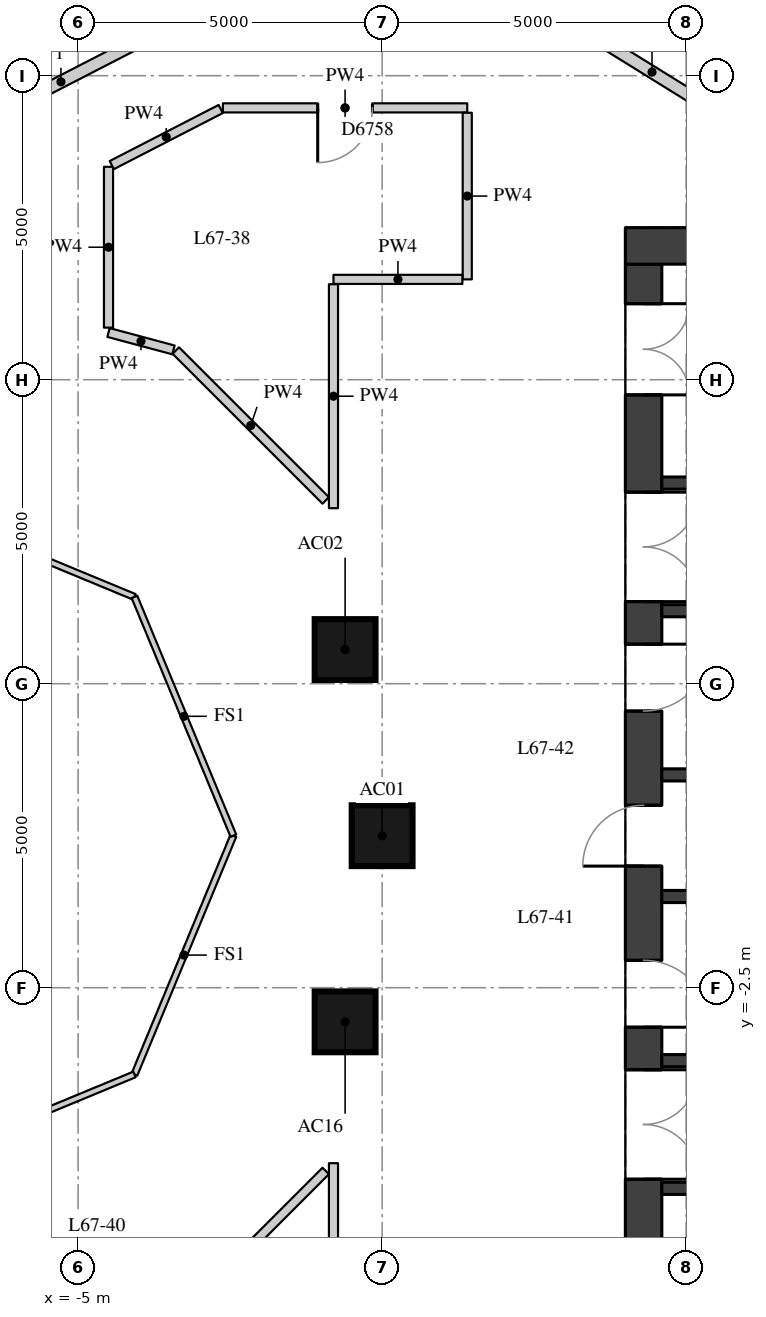
"""IFC4 building model, lengths in metres.
Left out: names, types, materials, properties, quantities, classifications, styles, units other than length and angle.
Written with IfcOpenShell. Run it as: python <this file> out.ifc"""

import sys

from ifc_helpers import new_model, si_unit, direction, frame, frame_2d, origin, origin_2d, place, context, subcontext, project, spatial, rectangle, extrude, element, fill, save


model = new_model("IFC4")
c1 = context("Model", 3, precision=1e-05, world=origin(), true_north=direction((0.0, 1.0)))
c2 = subcontext(c1, "Body", "Model", "MODEL_VIEW")
j1 = project(units=[si_unit("LENGTHUNIT", "METRE"), si_unit("PLANEANGLEUNIT", "RADIAN")], contexts=[c1])
p1 = place(None, origin())
s1 = spatial("IfcSite", under=j1, at=p1, CompositionType="ELEMENT")
p2 = place(p1, origin())
s2 = spatial("IfcBuilding", under=s1, at=p2, CompositionType="ELEMENT")
p3 = place(p2, frame((0.0, 0.0, 236.6)))
s3 = spatial("IfcBuildingStorey", under=s2, at=p3, CompositionType="ELEMENT", Elevation=236.6)
for number, where, z_axis, x_axis in (
    (1, (0.0, 0.0, 0.0), (0.0, 0.0, 1.0), (1.0, 0.0, 0.0)),
    (2, (-0.609, 3.062, 0.0), (0.0, 0.0, 1.0), (1.0, 0.0, 0.0)),
    (3, (-0.609, -3.062, 0.0), (0.0, 0.0, 1.0), (1.0, 0.0, 0.0)),
):
    element("IfcColumn", number, at=place(p3, frame(where, z_axis=z_axis, x_axis=x_axis)), inside=s3, PredefinedType="COLUMN", context=c2, shape_type="SweptSolid", body=[
        extrude(rectangle(XDim=1.0, YDim=1.0, at=origin_2d()), origin(), (0.0, 0.0, 1.0), 3.3),
    ])
p4 = place(p3, frame((4.3, -9.4, 0.0), z_axis=(0.0, 0.0, 1.0), x_axis=(0.0, 1.0, 0.0)))
e4 = element("IfcWall", 4, at=p4, inside=s3, PredefinedType="SHEAR", context=c2, shape_type="SweptSolid", body=[
    extrude(rectangle(XDim=18.8, YDim=0.6, at=frame_2d((9.4, 0.0))), origin(), (0.0, 0.0, 1.0), 3.02),
])
p5 = place(p4, frame((0.65, 0.0, 0.0)))
e5 = element("IfcOpeningElement", 5, at=p5, cuts=e4, PredefinedType="OPENING", context=c2, shape_type="SweptSolid", body=[
    extrude(rectangle(XDim=1.5, YDim=2.1, at=frame_2d((0.75, 1.05))), frame((0.0, 0.31, 0.0), z_axis=(0.0, -1.0, 0.0), x_axis=(1.0, 0.0, 0.0)), (0.0, 0.0, 1.0), 0.62),
])
p6 = place(p4, frame((3.75, 0.0, 0.0)))
e6 = element("IfcOpeningElement", 6, at=p6, cuts=e4, PredefinedType="OPENING", context=c2, shape_type="SweptSolid", body=[
    extrude(rectangle(XDim=1.8, YDim=2.1, at=frame_2d((0.9, 1.05))), frame((0.0, 0.31, 0.0), z_axis=(0.0, -1.0, 0.0), x_axis=(1.0, 0.0, 0.0)), (0.0, 0.0, 1.0), 0.62),
])
p7 = place(p4, frame((6.25, 0.0, 0.0)))
e7 = element("IfcOpeningElement", 7, at=p7, cuts=e4, PredefinedType="OPENING", context=c2, shape_type="SweptSolid", body=[
    extrude(rectangle(XDim=1.1, YDim=2.1, at=frame_2d((0.55, 1.05))), frame((0.0, 0.31, 0.0), z_axis=(0.0, -1.0, 0.0), x_axis=(1.0, 0.0, 0.0)), (0.0, 0.0, 1.0), 0.62),
])
p8 = place(p4, frame((8.9, 0.0, 0.0)))
e8 = element("IfcOpeningElement", 8, at=p8, cuts=e4, PredefinedType="OPENING", context=c2, shape_type="SweptSolid", body=[
    extrude(rectangle(XDim=1.0, YDim=2.1, at=frame_2d((0.5, 1.05))), frame((0.0, 0.31, 0.0), z_axis=(0.0, -1.0, 0.0), x_axis=(1.0, 0.0, 0.0)), (0.0, 0.0, 1.0), 0.62),
])
p9 = place(p4, frame((11.45, 0.0, 0.0)))
e9 = element("IfcOpeningElement", 9, at=p9, cuts=e4, PredefinedType="OPENING", context=c2, shape_type="SweptSolid", body=[
    extrude(rectangle(XDim=1.1, YDim=2.1, at=frame_2d((0.55, 1.05))), frame((0.0, 0.31, 0.0), z_axis=(0.0, -1.0, 0.0), x_axis=(1.0, 0.0, 0.0)), (0.0, 0.0, 1.0), 0.62),
])
p10 = place(p4, frame((13.25, 0.0, 0.0)))
e10 = element("IfcOpeningElement", 10, at=p10, cuts=e4, PredefinedType="OPENING", context=c2, shape_type="SweptSolid", body=[
    extrude(rectangle(XDim=1.8, YDim=2.1, at=frame_2d((0.9, 1.05))), frame((0.0, 0.31, 0.0), z_axis=(0.0, -1.0, 0.0), x_axis=(1.0, 0.0, 0.0)), (0.0, 0.0, 1.0), 0.62),
])
p11 = place(p4, frame((16.65, 0.0, 0.0)))
e11 = element("IfcOpeningElement", 11, at=p11, cuts=e4, PredefinedType="OPENING", context=c2, shape_type="SweptSolid", body=[
    extrude(rectangle(XDim=1.5, YDim=2.1, at=frame_2d((0.75, 1.05))), frame((0.0, 0.31, 0.0), z_axis=(0.0, -1.0, 0.0), x_axis=(1.0, 0.0, 0.0)), (0.0, 0.0, 1.0), 0.62),
])
p12 = place(p3, frame((4.0, 9.7, 0.0), z_axis=(0.0, 0.0, 1.0), x_axis=(1.0, 0.0, 0.0)))
e12 = element("IfcWall", 12, at=p12, inside=s3, PredefinedType="SHEAR", context=c2, shape_type="SweptSolid", body=[
    extrude(rectangle(XDim=12.0, YDim=0.6, at=frame_2d((6.0, 0.0))), origin(), (0.0, 0.0, 1.0), 3.02),
])
p13 = place(p3, frame((4.6, 5.8, 0.0), z_axis=(0.0, 0.0, 1.0), x_axis=(1.0, 0.0, 0.0)))
e13 = element("IfcWall", 13, at=p13, inside=s3, PredefinedType="SHEAR", context=c2, shape_type="SweptSolid", body=[
    extrude(rectangle(XDim=10.8, YDim=0.2, at=frame_2d((5.4, 0.0))), origin(), (0.0, 0.0, 1.0), 3.02),
])
p14 = place(p13, frame((7.05, 0.0, 0.0)))
e14 = element("IfcOpeningElement", 14, at=p14, cuts=e13, PredefinedType="OPENING", context=c2, shape_type="SweptSolid", body=[
    extrude(rectangle(XDim=1.1, YDim=2.1, at=frame_2d((0.55, 1.05))), frame((0.0, 0.11, 0.0), z_axis=(0.0, -1.0, 0.0), x_axis=(1.0, 0.0, 0.0)), (0.0, 0.0, 1.0), 0.22),
])
p15 = place(p13, frame((9.05, 0.0, 0.0)))
e15 = element("IfcOpeningElement", 15, at=p15, cuts=e13, PredefinedType="OPENING", context=c2, shape_type="SweptSolid", body=[
    extrude(rectangle(XDim=1.1, YDim=2.1, at=frame_2d((0.55, 1.05))), frame((0.0, 0.11, 0.0), z_axis=(0.0, -1.0, 0.0), x_axis=(1.0, 0.0, 0.0)), (0.0, 0.0, 1.0), 0.22),
])
p16 = place(p3, frame((4.6, 3.7, 0.0), z_axis=(0.0, 0.0, 1.0), x_axis=(1.0, 0.0, 0.0)))
e16 = element("IfcWall", 16, at=p16, inside=s3, PredefinedType="SHEAR", context=c2, shape_type="SweptSolid", body=[
    extrude(rectangle(XDim=10.8, YDim=0.2, at=frame_2d((5.4, 0.0))), origin(), (0.0, 0.0, 1.0), 3.02),
])
p17 = place(p16, frame((6.6, 0.0, 0.0)))
e17 = element("IfcOpeningElement", 17, at=p17, cuts=e16, PredefinedType="OPENING", context=c2, shape_type="SweptSolid", body=[
    extrude(rectangle(XDim=1.1, YDim=2.1, at=frame_2d((0.55, 1.05))), frame((0.0, 0.11, 0.0), z_axis=(0.0, -1.0, 0.0), x_axis=(1.0, 0.0, 0.0)), (0.0, 0.0, 1.0), 0.22),
])
p18 = place(p16, frame((8.9, 0.0, 0.0)))
e18 = element("IfcOpeningElement", 18, at=p18, cuts=e16, PredefinedType="OPENING", context=c2, shape_type="SweptSolid", body=[
    extrude(rectangle(XDim=1.1, YDim=2.1, at=frame_2d((0.55, 1.05))), frame((0.0, 0.11, 0.0), z_axis=(0.0, -1.0, 0.0), x_axis=(1.0, 0.0, 0.0)), (0.0, 0.0, 1.0), 0.22),
])
for number, where, z_axis, x_axis in (
    (19, (4.6, 1.0, 0.0), (0.0, 0.0, 1.0), (1.0, 0.0, 0.0)),
    (20, (4.6, -1.0, 0.0), (0.0, 0.0, 1.0), (1.0, 0.0, 0.0)),
):
    element("IfcWall", number, at=place(p3, frame(where, z_axis=z_axis, x_axis=x_axis)), inside=s3, PredefinedType="SHEAR", context=c2, shape_type="SweptSolid", body=[
        extrude(rectangle(XDim=10.8, YDim=0.2, at=frame_2d((5.4, 0.0))), origin(), (0.0, 0.0, 1.0), 3.02),
    ])
p19 = place(p3, frame((4.6, -3.7, 0.0), z_axis=(0.0, 0.0, 1.0), x_axis=(1.0, 0.0, 0.0)))
e21 = element("IfcWall", 21, at=p19, inside=s3, PredefinedType="SHEAR", context=c2, shape_type="SweptSolid", body=[
    extrude(rectangle(XDim=10.8, YDim=0.2, at=frame_2d((5.4, 0.0))), origin(), (0.0, 0.0, 1.0), 3.02),
])
p20 = place(p19, frame((6.6, 0.0, 0.0)))
e22 = element("IfcOpeningElement", 22, at=p20, cuts=e21, PredefinedType="OPENING", context=c2, shape_type="SweptSolid", body=[
    extrude(rectangle(XDim=1.1, YDim=2.1, at=frame_2d((0.55, 1.05))), frame((0.0, 0.11, 0.0), z_axis=(0.0, -1.0, 0.0), x_axis=(1.0, 0.0, 0.0)), (0.0, 0.0, 1.0), 0.22),
])
p21 = place(p19, frame((8.9, 0.0, 0.0)))
e23 = element("IfcOpeningElement", 23, at=p21, cuts=e21, PredefinedType="OPENING", context=c2, shape_type="SweptSolid", body=[
    extrude(rectangle(XDim=1.1, YDim=2.1, at=frame_2d((0.55, 1.05))), frame((0.0, 0.11, 0.0), z_axis=(0.0, -1.0, 0.0), x_axis=(1.0, 0.0, 0.0)), (0.0, 0.0, 1.0), 0.22),
])
p22 = place(p3, frame((4.6, -5.8, 0.0), z_axis=(0.0, 0.0, 1.0), x_axis=(1.0, 0.0, 0.0)))
e24 = element("IfcWall", 24, at=p22, inside=s3, PredefinedType="SHEAR", context=c2, shape_type="SweptSolid", body=[
    extrude(rectangle(XDim=10.8, YDim=0.2, at=frame_2d((5.4, 0.0))), origin(), (0.0, 0.0, 1.0), 3.02),
])
p23 = place(p3, frame((-7.557, 11.227, 0.0), z_axis=(0.0, 0.0, 1.0), x_axis=(0.889060449642, 0.457789817364, 0.0)))
e25 = element("IfcWall", 25, at=p23, inside=s3, PredefinedType="PARTITIONING", context=c2, shape_type="SweptSolid", body=[
    extrude(rectangle(XDim=5.119, YDim=0.2, at=frame_2d((2.559, 0.0))), origin(), (0.0, 0.0, 1.0), 3.02),
])
p24 = place(p3, frame((2.892, 13.518, 0.0), z_axis=(0.0, 0.0, 1.0), x_axis=(0.849866037624, -0.526998783769, 0.0)))
e26 = element("IfcWall", 26, at=p24, inside=s3, PredefinedType="PARTITIONING", context=c2, shape_type="SweptSolid", body=[
    extrude(rectangle(XDim=3.639, YDim=0.2, at=frame_2d((1.82, 0.0))), origin(), (0.0, 0.0, 1.0), 3.02),
])
p25 = place(p3, frame((-2.619, 11.97, 0.0), z_axis=(0.0, 0.0, 1.0), x_axis=(1.0, 0.0, 0.0)))
e27 = element("IfcWall", 27, at=p25, inside=s3, PredefinedType="PARTITIONING", context=c2, shape_type="SweptSolid", body=[
    extrude(rectangle(XDim=4.019, YDim=0.15, at=frame_2d((2.009, 0.0))), origin(), (0.0, 0.0, 1.0), 3.02),
])
p26 = place(p25, frame((1.559, 0.0, 0.0)))
e28 = element("IfcOpeningElement", 28, at=p26, cuts=e27, PredefinedType="OPENING", context=c2, shape_type="SweptSolid", body=[
    extrude(rectangle(XDim=0.9, YDim=2.1, at=frame_2d((0.45, 1.05))), frame((0.0, 0.085, 0.0), z_axis=(0.0, -1.0, 0.0), x_axis=(1.0, 0.0, 0.0)), (0.0, 0.0, 1.0), 0.17),
])
p27 = place(p3, frame((1.4, 11.89, 0.0), z_axis=(0.0, 0.0, 1.0), x_axis=(0.0, -1.0, 0.0)))
e29 = element("IfcWall", 29, at=p27, inside=s3, PredefinedType="PARTITIONING", context=c2, shape_type="SweptSolid", body=[
    extrude(rectangle(XDim=2.74, YDim=0.15, at=frame_2d((1.37, 0.0))), origin(), (0.0, 0.0, 1.0), 3.02),
])
p28 = place(p3, frame((1.32, 9.15, 0.0), z_axis=(0.0, 0.0, 1.0), x_axis=(-1.0, 0.0, 0.0)))
e30 = element("IfcWall", 30, at=p28, inside=s3, PredefinedType="PARTITIONING", context=c2, shape_type="SweptSolid", body=[
    extrude(rectangle(XDim=2.12, YDim=0.15, at=frame_2d((1.06, 0.0))), origin(), (0.0, 0.0, 1.0), 3.02),
])
p29 = place(p3, frame((-0.8, 9.07, 0.0), z_axis=(0.0, 0.0, 1.0), x_axis=(0.0, -1.0, 0.0)))
e31 = element("IfcWall", 31, at=p29, inside=s3, PredefinedType="PARTITIONING", context=c2, shape_type="SweptSolid", body=[
    extrude(rectangle(XDim=3.683, YDim=0.15, at=frame_2d((1.842, 0.0))), origin(), (0.0, 0.0, 1.0), 3.02),
])
p30 = place(p3, frame((-0.927, 5.514, 0.0), z_axis=(0.0, 0.0, 1.0), x_axis=(-0.707106781187, 0.707106781187, 0.0)))
e32 = element("IfcWall", 32, at=p30, inside=s3, PredefinedType="PARTITIONING", context=c2, shape_type="SweptSolid", body=[
    extrude(rectangle(XDim=3.487, YDim=0.15, at=frame_2d((1.743, 0.0))), origin(), (0.0, 0.0, 1.0), 3.02),
])
p31 = place(p3, frame((-3.432, 7.99, 0.0), z_axis=(0.0, 0.0, 1.0), x_axis=(-0.965900750832, 0.258912609855, 0.0)))
e33 = element("IfcWall", 33, at=p31, inside=s3, PredefinedType="PARTITIONING", context=c2, shape_type="SweptSolid", body=[
    extrude(rectangle(XDim=1.106, YDim=0.15, at=frame_2d((0.553, 0.0))), origin(), (0.0, 0.0, 1.0), 3.02),
])
p32 = place(p3, frame((-4.5, 8.356, 0.0), z_axis=(0.0, 0.0, 1.0), x_axis=(0.0, 1.0, 0.0)))
e34 = element("IfcWall", 34, at=p32, inside=s3, PredefinedType="PARTITIONING", context=c2, shape_type="SweptSolid", body=[
    extrude(rectangle(XDim=2.645, YDim=0.15, at=frame_2d((1.323, 0.0))), origin(), (0.0, 0.0, 1.0), 3.02),
])
p33 = place(p3, frame((-4.447, 11.029, 0.0), z_axis=(0.0, 0.0, 1.0), x_axis=(0.88908361723, 0.457744821459, 0.0)))
e35 = element("IfcWall", 35, at=p33, inside=s3, PredefinedType="PARTITIONING", context=c2, shape_type="SweptSolid", body=[
    extrude(rectangle(XDim=2.016, YDim=0.15, at=frame_2d((1.008, 0.0))), origin(), (0.0, 0.0, 1.0), 3.02),
])
p34 = place(p3, frame((-0.8, -5.386, 0.0), z_axis=(0.0, 0.0, 1.0), x_axis=(0.0, -1.0, 0.0)))
e36 = element("IfcWall", 36, at=p34, inside=s3, PredefinedType="PARTITIONING", context=c2, shape_type="SweptSolid", body=[
    extrude(rectangle(XDim=4.805, YDim=0.15, at=frame_2d((2.403, 0.0))), origin(), (0.0, 0.0, 1.0), 3.02),
])
p35 = place(p34, frame((1.953, 0.0, 0.0)))
e37 = element("IfcOpeningElement", 37, at=p35, cuts=e36, PredefinedType="OPENING", context=c2, shape_type="SweptSolid", body=[
    extrude(rectangle(XDim=0.9, YDim=2.1, at=frame_2d((0.45, 1.05))), frame((0.0, 0.085, 0.0), z_axis=(0.0, -1.0, 0.0), x_axis=(1.0, 0.0, 0.0)), (0.0, 0.0, 1.0), 0.17),
])
p36 = place(p3, frame((-4.864, -9.45, 0.0), z_axis=(0.0, 0.0, 1.0), x_axis=(0.707106781187, 0.707106781187, 0.0)))
e38 = element("IfcWall", 38, at=p36, inside=s3, PredefinedType="PARTITIONING", context=c2, shape_type="SweptSolid", body=[
    extrude(rectangle(XDim=5.566, YDim=0.15, at=frame_2d((2.783, 0.0))), origin(), (0.0, 0.0, 1.0), 3.02),
])
for number, where, z_axis, x_axis in (
    (39, (-2.446, 0.0, 0.0), (0.0, 0.0, 1.0), (-0.383, -0.924, 0.0)),
    (40, (-4.073, -3.927, 0.0), (0.0, 0.0, 1.0), (-0.924, -0.383, 0.0)),
    (41, (-8.0, 5.554, 0.0), (0.0, 0.0, 1.0), (0.924, -0.383, 0.0)),
    (42, (-4.073, 3.927, 0.0), (0.0, 0.0, 1.0), (0.383, -0.924, 0.0)),
):
    element("IfcWall", number, at=place(p3, frame(where, z_axis=z_axis, x_axis=x_axis)), inside=s3, PredefinedType="PARTITIONING", context=c2, shape_type="SweptSolid", body=[
        extrude(rectangle(XDim=4.251, YDim=0.1, at=frame_2d((2.125, 0.0))), origin(), (0.0, 0.0, 1.0), 3.02),
    ])
p37 = place(p6, origin())
e43 = element("IfcDoor", 43, at=p37, inside=s3, OperationType="DOUBLE_DOOR_SINGLE_SWING", PredefinedType="DOOR", context=c2, shape_type="SweptSolid", body=[
    extrude(rectangle(XDim=1.8, YDim=2.1, at=frame_2d((0.9, 1.05))), frame((0.0, 0.025, 0.0), z_axis=(0.0, -1.0, 0.0), x_axis=(1.0, 0.0, 0.0)), (0.0, 0.0, 1.0), 0.05),
])
fill(e6, e43)
p38 = place(p7, origin())
e44 = element("IfcDoor", 44, at=p38, inside=s3, OperationType="SINGLE_SWING_RIGHT", PredefinedType="DOOR", context=c2, shape_type="SweptSolid", body=[
    extrude(rectangle(XDim=1.1, YDim=2.1, at=frame_2d((0.55, 1.05))), frame((0.0, 0.025, 0.0), z_axis=(0.0, -1.0, 0.0), x_axis=(1.0, 0.0, 0.0)), (0.0, 0.0, 1.0), 0.05),
])
fill(e7, e44)
p39 = place(p8, origin())
e45 = element("IfcDoor", 45, at=p39, inside=s3, OperationType="SINGLE_SWING_LEFT", PredefinedType="DOOR", context=c2, shape_type="SweptSolid", body=[
    extrude(rectangle(XDim=1.0, YDim=2.1, at=frame_2d((0.5, 1.05))), frame((0.0, 0.025, 0.0), z_axis=(0.0, -1.0, 0.0), x_axis=(1.0, 0.0, 0.0)), (0.0, 0.0, 1.0), 0.05),
])
fill(e8, e45)
p40 = place(p9, origin())
e46 = element("IfcDoor", 46, at=p40, inside=s3, OperationType="SINGLE_SWING_LEFT", PredefinedType="DOOR", context=c2, shape_type="SweptSolid", body=[
    extrude(rectangle(XDim=1.1, YDim=2.1, at=frame_2d((0.55, 1.05))), frame((0.0, 0.025, 0.0), z_axis=(0.0, -1.0, 0.0), x_axis=(1.0, 0.0, 0.0)), (0.0, 0.0, 1.0), 0.05),
])
fill(e9, e46)
p41 = place(p10, origin())
e47 = element("IfcDoor", 47, at=p41, inside=s3, OperationType="DOUBLE_DOOR_SINGLE_SWING", PredefinedType="DOOR", context=c2, shape_type="SweptSolid", body=[
    extrude(rectangle(XDim=1.8, YDim=2.1, at=frame_2d((0.9, 1.05))), frame((0.0, 0.025, 0.0), z_axis=(0.0, -1.0, 0.0), x_axis=(1.0, 0.0, 0.0)), (0.0, 0.0, 1.0), 0.05),
])
fill(e10, e47)
p42 = place(p11, origin())
e48 = element("IfcDoor", 48, at=p42, inside=s3, OperationType="DOUBLE_DOOR_SINGLE_SWING", PredefinedType="DOOR", context=c2, shape_type="SweptSolid", body=[
    extrude(rectangle(XDim=1.5, YDim=2.1, at=frame_2d((0.75, 1.05))), frame((0.0, 0.025, 0.0), z_axis=(0.0, -1.0, 0.0), x_axis=(1.0, 0.0, 0.0)), (0.0, 0.0, 1.0), 0.05),
])
fill(e11, e48)
p43 = place(p26, origin())
e49 = element("IfcDoor", 49, at=p43, inside=s3, OperationType="SINGLE_SWING_RIGHT", PredefinedType="DOOR", context=c2, shape_type="SweptSolid", body=[
    extrude(rectangle(XDim=0.9, YDim=2.1, at=frame_2d((0.45, 1.05))), frame((0.0, 0.025, 0.0), z_axis=(0.0, -1.0, 0.0), x_axis=(1.0, 0.0, 0.0)), (0.0, 0.0, 1.0), 0.05),
])
fill(e28, e49)
save(model, sys.argv[1])
